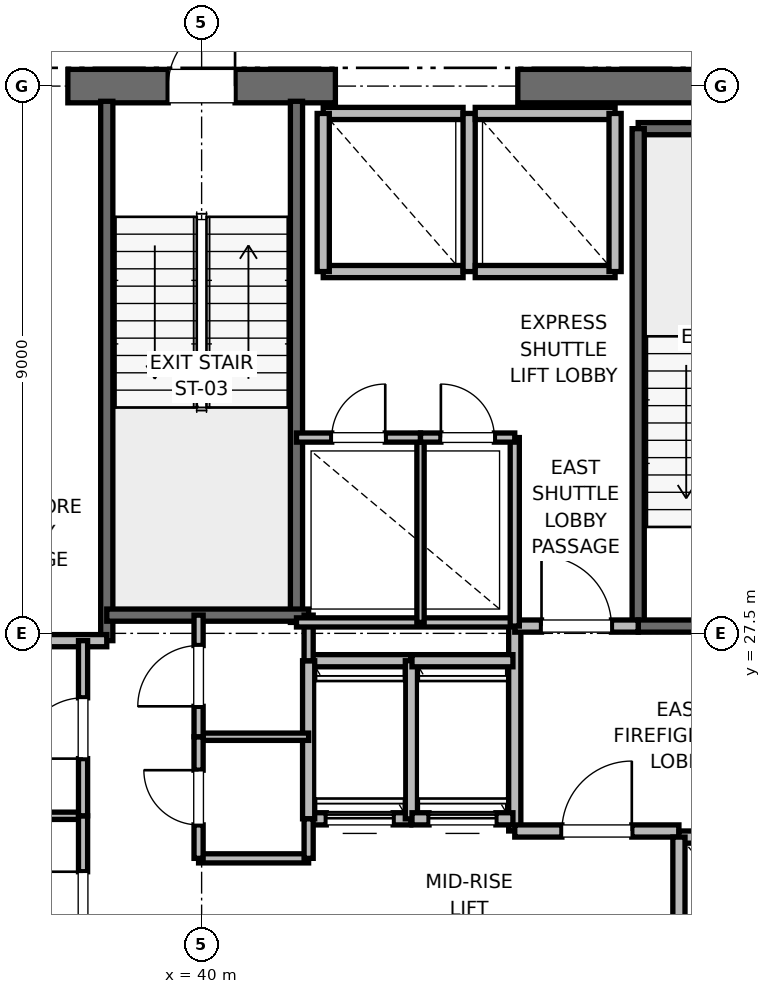
"""IFC4 building model, lengths in metres.
Left out: names, types, materials, properties, quantities, classifications, styles, units other than length and angle.
Written with IfcOpenShell. Run it as: python <this file> out.ifc"""

import sys

from ifc_helpers import new_model, si_unit, direction, frame, frame_2d, origin, place, context, subcontext, project, spatial, rectangle, extrude, element, fill, save


model = new_model("IFC4")
c1 = context("Model", 3, precision=1e-05, world=origin(), true_north=direction((0.0, 1.0)))
c2 = subcontext(c1, "Body", "Model", "MODEL_VIEW")
j1 = project(units=[si_unit("LENGTHUNIT", "METRE"), si_unit("PLANEANGLEUNIT", "RADIAN")], contexts=[c1])
p1 = place(None, origin())
s1 = spatial("IfcSite", under=j1, at=p1, CompositionType="ELEMENT")
p2 = place(p1, origin())
s2 = spatial("IfcBuilding", under=s1, at=p2, CompositionType="ELEMENT")
p3 = place(p2, frame((0.0, 0.0, 209.2)))
s3 = spatial("IfcBuildingStorey", under=s2, at=p3, CompositionType="ELEMENT", Elevation=209.2)
p4 = place(p3, frame((37.8, 36.5, 0.0), z_axis=(0.0, 0.0, 1.0), x_axis=(1.0, 0.0, 0.0)))
e1 = element("IfcWall", 1, at=p4, inside=s3, PredefinedType="SHEAR", context=c2, shape_type="SweptSolid", body=[
    extrude(rectangle(XDim=4.4, YDim=0.55, at=frame_2d((2.2, 0.0))), origin(), (0.0, 0.0, 1.0), 3.775),
])
p5 = place(p4, frame((1.65, 0.0, 0.0)))
e2 = element("IfcOpeningElement", 2, at=p5, cuts=e1, PredefinedType="OPENING", context=c2, shape_type="SweptSolid", body=[
    extrude(rectangle(XDim=1.1, YDim=2.15, at=frame_2d((0.55, 1.075))), frame((0.0, 0.275, 0.0), z_axis=(0.0, -1.0, 0.0), x_axis=(1.0, 0.0, 0.0)), (0.0, 0.0, 1.0), 0.55),
])
p6 = place(p3, frame((45.2, 36.5, 0.0), z_axis=(0.0, 0.0, 1.0), x_axis=(1.0, 0.0, 0.0)))
e3 = element("IfcWall", 3, at=p6, inside=s3, PredefinedType="SHEAR", context=c2, shape_type="SweptSolid", body=[
    extrude(rectangle(XDim=5.8, YDim=0.55, at=frame_2d((2.9, 0.0))), origin(), (0.0, 0.0, 1.0), 3.775),
])
p7 = place(p3, frame((47.18, 35.8, 0.0), z_axis=(0.0, 0.0, 1.0), x_axis=(1.0, 0.0, 0.0)))
e4 = element("IfcWall", 4, at=p7, inside=s3, PredefinedType="SOLIDWALL", context=c2, shape_type="SweptSolid", body=[
    extrude(rectangle(XDim=3.12, YDim=0.2, at=frame_2d((1.56, 0.0))), origin(), (0.0, 0.0, 1.0), 3.775),
])
p8 = place(p3, frame((47.18, 27.62, 0.0), z_axis=(0.0, 0.0, 1.0), x_axis=(0.0, 1.0, 0.0)))
e5 = element("IfcWall", 5, at=p8, inside=s3, PredefinedType="SOLIDWALL", context=c2, shape_type="SweptSolid", body=[
    extrude(rectangle(XDim=8.18, YDim=0.2, at=frame_2d((4.09, 0.0))), origin(), (0.0, 0.0, 1.0), 3.775),
])
p9 = place(p3, frame((47.18, 27.62, 0.0), z_axis=(0.0, 0.0, 1.0), x_axis=(1.0, 0.0, 0.0)))
e6 = element("IfcWall", 6, at=p9, inside=s3, PredefinedType="SOLIDWALL", context=c2, shape_type="SweptSolid", body=[
    extrude(rectangle(XDim=3.12, YDim=0.2, at=frame_2d((1.56, 0.0))), origin(), (0.0, 0.0, 1.0), 3.775),
])
p10 = place(p9, frame((1.01, 0.0, 0.0)))
e7 = element("IfcOpeningElement", 7, at=p10, cuts=e6, PredefinedType="OPENING", context=c2, shape_type="SweptSolid", body=[
    extrude(rectangle(XDim=1.1, YDim=2.15, at=frame_2d((0.55, 1.075))), frame((0.0, 0.1, 0.0), z_axis=(0.0, -1.0, 0.0), x_axis=(1.0, 0.0, 0.0)), (0.0, 0.0, 1.0), 0.2),
])
p11 = place(p3, frame((38.44, 27.38, 0.0), z_axis=(0.0, 0.0, 1.0), x_axis=(0.0, 1.0, 0.0)))
e8 = element("IfcWall", 8, at=p11, inside=s3, PredefinedType="SOLIDWALL", context=c2, shape_type="SweptSolid", body=[
    extrude(rectangle(XDim=8.87, YDim=0.2, at=frame_2d((4.435, 0.0))), origin(), (0.0, 0.0, 1.0), 3.775),
])
p12 = place(p3, frame((41.56, 27.68, 0.0), z_axis=(0.0, 0.0, 1.0), x_axis=(0.0, 1.0, 0.0)))
e9 = element("IfcWall", 9, at=p12, inside=s3, PredefinedType="SOLIDWALL", context=c2, shape_type="SweptSolid", body=[
    extrude(rectangle(XDim=8.57, YDim=0.2, at=frame_2d((4.285, 0.0))), origin(), (0.0, 0.0, 1.0), 3.775),
])
p13 = place(p3, frame((38.44, 27.8, 0.0), z_axis=(0.0, 0.0, 1.0), x_axis=(1.0, 0.0, 0.0)))
e10 = element("IfcWall", 10, at=p13, inside=s3, PredefinedType="SOLIDWALL", context=c2, shape_type="SweptSolid", body=[
    extrude(rectangle(XDim=3.32, YDim=0.2, at=frame_2d((1.66, 0.0))), origin(), (0.0, 0.0, 1.0), 3.775),
])
p14 = place(p3, frame((32.82, 27.38, 0.0), z_axis=(0.0, 0.0, 1.0), x_axis=(1.0, 0.0, 0.0)))
e11 = element("IfcWall", 11, at=p14, inside=s3, PredefinedType="PARTITIONING", context=c2, shape_type="SweptSolid", body=[
    extrude(rectangle(XDim=5.62, YDim=0.2, at=frame_2d((2.81, 0.0))), origin(), (0.0, 0.0, 1.0), 3.775),
])
p15 = place(p3, frame((45.15, 24.25, 0.0), z_axis=(0.0, 0.0, 1.0), x_axis=(0.0, 1.0, 0.0)))
e12 = element("IfcWall", 12, at=p15, inside=s3, PredefinedType="PARTITIONING", context=c2, shape_type="SweptSolid", body=[
    extrude(rectangle(XDim=3.37, YDim=0.2, at=frame_2d((1.685, 0.0))), origin(), (0.0, 0.0, 1.0), 3.775),
])
p16 = place(p3, frame((45.15, 24.25, 0.0), z_axis=(0.0, 0.0, 1.0), x_axis=(1.0, 0.0, 0.0)))
e13 = element("IfcWall", 13, at=p16, inside=s3, PredefinedType="PARTITIONING", context=c2, shape_type="SweptSolid", body=[
    extrude(rectangle(XDim=2.7, YDim=0.2, at=frame_2d((1.35, 0.0))), origin(), (0.0, 0.0, 1.0), 3.775),
])
p17 = place(p16, frame((0.775, 0.0, 0.0)))
e14 = element("IfcOpeningElement", 14, at=p17, cuts=e13, PredefinedType="OPENING", context=c2, shape_type="SweptSolid", body=[
    extrude(rectangle(XDim=1.15, YDim=2.2, at=frame_2d((0.575, 1.1))), frame((0.0, 0.1, 0.0), z_axis=(0.0, -1.0, 0.0), x_axis=(1.0, 0.0, 0.0)), (0.0, 0.0, 1.0), 0.2),
])
p18 = place(p3, frame((45.15, 27.62, 0.0), z_axis=(0.0, 0.0, 1.0), x_axis=(1.0, 0.0, 0.0)))
e15 = element("IfcWall", 15, at=p18, inside=s3, PredefinedType="PARTITIONING", context=c2, shape_type="SweptSolid", body=[
    extrude(rectangle(XDim=2.03, YDim=0.2, at=frame_2d((1.015, 0.0))), origin(), (0.0, 0.0, 1.0), 3.775),
])
p19 = place(p18, frame((0.44, 0.0, 0.0)))
e16 = element("IfcOpeningElement", 16, at=p19, cuts=e15, PredefinedType="OPENING", context=c2, shape_type="SweptSolid", body=[
    extrude(rectangle(XDim=1.15, YDim=2.2, at=frame_2d((0.575, 1.1))), frame((0.0, 0.1, 0.0), z_axis=(0.0, -1.0, 0.0), x_axis=(1.0, 0.0, 0.0)), (0.0, 0.0, 1.0), 0.2),
])
p20 = place(p3, frame((50.45, 24.15, 0.0), z_axis=(0.0, 0.0, 1.0), x_axis=(-1.0, 0.0, 0.0)))
e17 = element("IfcWall", 17, at=p20, inside=s3, PredefinedType="SOLIDWALL", context=c2, shape_type="SweptSolid", body=[
    extrude(rectangle(XDim=2.6, YDim=0.2, at=frame_2d((1.3, 0.0))), origin(), (0.0, 0.0, 1.0), 2.755),
])
p21 = place(p20, frame((0.75, 0.0, 0.0)))
e18 = element("IfcOpeningElement", 18, at=p21, cuts=e17, PredefinedType="OPENING", context=c2, shape_type="SweptSolid", body=[
    extrude(rectangle(XDim=1.1, YDim=2.2, at=frame_2d((0.55, 1.1))), frame((0.0, 0.1, 0.0), z_axis=(0.0, -1.0, 0.0), x_axis=(1.0, 0.0, 0.0)), (0.0, 0.0, 1.0), 0.2),
])
p22 = place(p3, frame((47.85, 24.15, 0.0), z_axis=(0.0, 0.0, 1.0), x_axis=(0.0, -1.0, 0.0)))
e19 = element("IfcWall", 19, at=p22, inside=s3, PredefinedType="SOLIDWALL", context=c2, shape_type="SweptSolid", body=[
    extrude(rectangle(XDim=3.0, YDim=0.2, at=frame_2d((1.5, 0.0))), origin(), (0.0, 0.0, 1.0), 3.775),
])
p23 = place(p3, frame((41.76, 24.45, 0.0), z_axis=(0.0, 0.0, 1.0), x_axis=(1.0, 0.0, 0.0)))
e20 = element("IfcWall", 20, at=p23, inside=s3, PredefinedType="SOLIDWALL", context=c2, shape_type="SweptSolid", body=[
    extrude(rectangle(XDim=1.68, YDim=0.2, at=frame_2d((0.84, 0.0))), origin(), (0.0, 0.0, 1.0), 3.775),
])
p24 = place(p23, frame((0.29, 0.0, 0.0)))
e21 = element("IfcOpeningElement", 21, at=p24, cuts=e20, PredefinedType="OPENING", context=c2, shape_type="SweptSolid", body=[
    extrude(rectangle(XDim=1.1, YDim=2.2, at=frame_2d((0.55, 1.1))), frame((0.0, 0.1, 0.0), z_axis=(0.0, -1.0, 0.0), x_axis=(1.0, 0.0, 0.0)), (0.0, 0.0, 1.0), 0.2),
])
p25 = place(p3, frame((43.44, 27.05, 0.0), z_axis=(0.0, 0.0, 1.0), x_axis=(-1.0, 0.0, 0.0)))
e22 = element("IfcWall", 22, at=p25, inside=s3, PredefinedType="SOLIDWALL", context=c2, shape_type="SweptSolid", body=[
    extrude(rectangle(XDim=1.68, YDim=0.2, at=frame_2d((0.84, 0.0))), origin(), (0.0, 0.0, 1.0), 3.775),
])
for number, where, z_axis, x_axis in (
    (23, (41.76, 27.05, 0.0), (0.0, 0.0, 1.0), (0.0, -1.0, 0.0)),
    (24, (43.45, 24.45, 0.0), (0.0, 0.0, 1.0), (0.0, 1.0, 0.0)),
):
    element("IfcWall", number, at=place(p3, frame(where, z_axis=z_axis, x_axis=x_axis)), inside=s3, PredefinedType="SOLIDWALL", context=c2, shape_type="SweptSolid", body=[
        extrude(rectangle(XDim=2.6, YDim=0.2, at=frame_2d((1.3, 0.0))), origin(), (0.0, 0.0, 1.0), 3.775),
    ])
p26 = place(p3, frame((43.46, 24.45, 0.0), z_axis=(0.0, 0.0, 1.0), x_axis=(1.0, 0.0, 0.0)))
e25 = element("IfcWall", 25, at=p26, inside=s3, PredefinedType="SOLIDWALL", context=c2, shape_type="SweptSolid", body=[
    extrude(rectangle(XDim=1.66, YDim=0.2, at=frame_2d((0.83, 0.0))), origin(), (0.0, 0.0, 1.0), 3.775),
])
p27 = place(p26, frame((0.28, 0.0, 0.0)))
e26 = element("IfcOpeningElement", 26, at=p27, cuts=e25, PredefinedType="OPENING", context=c2, shape_type="SweptSolid", body=[
    extrude(rectangle(XDim=1.1, YDim=2.2, at=frame_2d((0.55, 1.1))), frame((0.0, 0.1, 0.0), z_axis=(0.0, -1.0, 0.0), x_axis=(1.0, 0.0, 0.0)), (0.0, 0.0, 1.0), 0.2),
])
p28 = place(p3, frame((45.12, 27.05, 0.0), z_axis=(0.0, 0.0, 1.0), x_axis=(-1.0, 0.0, 0.0)))
e27 = element("IfcWall", 27, at=p28, inside=s3, PredefinedType="SOLIDWALL", context=c2, shape_type="SweptSolid", body=[
    extrude(rectangle(XDim=1.66, YDim=0.2, at=frame_2d((0.83, 0.0))), origin(), (0.0, 0.0, 1.0), 3.775),
])
p29 = place(p3, frame((42.0, 33.45, 0.0), z_axis=(0.0, 0.0, 1.0), x_axis=(1.0, 0.0, 0.0)))
e28 = element("IfcWall", 28, at=p29, inside=s3, PredefinedType="SOLIDWALL", context=c2, shape_type="SweptSolid", body=[
    extrude(rectangle(XDim=2.3, YDim=0.2, at=frame_2d((1.15, 0.0))), origin(), (0.0, 0.0, 1.0), 3.775),
])
p30 = place(p3, frame((44.3, 36.05, 0.0), z_axis=(0.0, 0.0, 1.0), x_axis=(-1.0, 0.0, 0.0)))
e29 = element("IfcWall", 29, at=p30, inside=s3, PredefinedType="SOLIDWALL", context=c2, shape_type="SweptSolid", body=[
    extrude(rectangle(XDim=2.3, YDim=0.2, at=frame_2d((1.15, 0.0))), origin(), (0.0, 0.0, 1.0), 2.755),
])
for number, where, z_axis, x_axis in (
    (30, (42.0, 36.05, 0.0), (0.0, 0.0, 1.0), (0.0, -1.0, 0.0)),
    (31, (44.4, 33.45, 0.0), (0.0, 0.0, 1.0), (0.0, 1.0, 0.0)),
):
    element("IfcWall", number, at=place(p3, frame(where, z_axis=z_axis, x_axis=x_axis)), inside=s3, PredefinedType="SOLIDWALL", context=c2, shape_type="SweptSolid", body=[
        extrude(rectangle(XDim=2.6, YDim=0.2, at=frame_2d((1.3, 0.0))), origin(), (0.0, 0.0, 1.0), 2.755),
    ])
p31 = place(p3, frame((44.5, 33.45, 0.0), z_axis=(0.0, 0.0, 1.0), x_axis=(1.0, 0.0, 0.0)))
e32 = element("IfcWall", 32, at=p31, inside=s3, PredefinedType="SOLIDWALL", context=c2, shape_type="SweptSolid", body=[
    extrude(rectangle(XDim=2.3, YDim=0.2, at=frame_2d((1.15, 0.0))), origin(), (0.0, 0.0, 1.0), 3.775),
])
p32 = place(p3, frame((46.8, 36.05, 0.0), z_axis=(0.0, 0.0, 1.0), x_axis=(-1.0, 0.0, 0.0)))
e33 = element("IfcWall", 33, at=p32, inside=s3, PredefinedType="SOLIDWALL", context=c2, shape_type="SweptSolid", body=[
    extrude(rectangle(XDim=2.3, YDim=0.2, at=frame_2d((1.15, 0.0))), origin(), (0.0, 0.0, 1.0), 2.755),
])
p33 = place(p3, frame((46.8, 33.45, 0.0), z_axis=(0.0, 0.0, 1.0), x_axis=(0.0, 1.0, 0.0)))
e34 = element("IfcWall", 34, at=p33, inside=s3, PredefinedType="SOLIDWALL", context=c2, shape_type="SweptSolid", body=[
    extrude(rectangle(XDim=2.6, YDim=0.2, at=frame_2d((1.3, 0.0))), origin(), (0.0, 0.0, 1.0), 3.775),
])
p34 = place(p3, frame((39.95, 23.8, 0.0), z_axis=(0.0, 0.0, 1.0), x_axis=(1.0, 0.0, 0.0)))
e35 = element("IfcWall", 35, at=p34, inside=s3, PredefinedType="PARTITIONING", context=c2, shape_type="SweptSolid", body=[
    extrude(rectangle(XDim=1.81, YDim=0.15, at=frame_2d((0.905, 0.0))), origin(), (0.0, 0.0, 1.0), 2.85),
])
p35 = place(p3, frame((39.95, 25.8, 0.0), z_axis=(0.0, 0.0, 1.0), x_axis=(1.0, 0.0, 0.0)))
e36 = element("IfcWall", 36, at=p35, inside=s3, PredefinedType="PARTITIONING", context=c2, shape_type="SweptSolid", body=[
    extrude(rectangle(XDim=1.81, YDim=0.12, at=frame_2d((0.905, 0.0))), origin(), (0.0, 0.0, 1.0), 2.85),
])
p36 = place(p3, frame((41.76, 23.8, 0.0), z_axis=(0.0, 0.0, 1.0), x_axis=(0.0, 1.0, 0.0)))
e37 = element("IfcWall", 37, at=p36, inside=s3, PredefinedType="PARTITIONING", context=c2, shape_type="SweptSolid", body=[
    extrude(rectangle(XDim=0.65, YDim=0.15, at=frame_2d((0.325, 0.0))), origin(), (0.0, 0.0, 1.0), 2.85),
])
p37 = place(p3, frame((41.76, 27.05, 0.0), z_axis=(0.0, 0.0, 1.0), x_axis=(0.0, 1.0, 0.0)))
e38 = element("IfcWall", 38, at=p37, inside=s3, PredefinedType="PARTITIONING", context=c2, shape_type="SweptSolid", body=[
    extrude(rectangle(XDim=0.75, YDim=0.15, at=frame_2d((0.375, 0.0))), origin(), (0.0, 0.0, 1.0), 2.85),
])
p38 = place(p3, frame((39.95, 23.8, 0.0), z_axis=(0.0, 0.0, 1.0), x_axis=(0.0, 1.0, 0.0)))
e39 = element("IfcWall", 39, at=p38, inside=s3, PredefinedType="PARTITIONING", context=c2, shape_type="SweptSolid", body=[
    extrude(rectangle(XDim=2.0, YDim=0.15, at=frame_2d((1.0, 0.0))), origin(), (0.0, 0.0, 1.0), 2.85),
])
p39 = place(p38, frame((0.55, 0.0, 0.0)))
e40 = element("IfcOpeningElement", 40, at=p39, cuts=e39, PredefinedType="OPENING", context=c2, shape_type="SweptSolid", body=[
    extrude(rectangle(XDim=0.9, YDim=2.1, at=frame_2d((0.45, 1.05))), frame((0.0, 0.075, 0.0), z_axis=(0.0, -1.0, 0.0), x_axis=(1.0, 0.0, 0.0)), (0.0, 0.0, 1.0), 0.15),
])
p40 = place(p3, frame((39.95, 25.8, 0.0), z_axis=(0.0, 0.0, 1.0), x_axis=(0.0, 1.0, 0.0)))
e41 = element("IfcWall", 41, at=p40, inside=s3, PredefinedType="PARTITIONING", context=c2, shape_type="SweptSolid", body=[
    extrude(rectangle(XDim=2.0, YDim=0.15, at=frame_2d((1.0, 0.0))), origin(), (0.0, 0.0, 1.0), 2.85),
])
p41 = place(p40, frame((0.5, 0.0, 0.0)))
e42 = element("IfcOpeningElement", 42, at=p41, cuts=e41, PredefinedType="OPENING", context=c2, shape_type="SweptSolid", body=[
    extrude(rectangle(XDim=1.0, YDim=2.15, at=frame_2d((0.5, 1.075))), frame((0.0, 0.075, 0.0), z_axis=(0.0, -1.0, 0.0), x_axis=(1.0, 0.0, 0.0)), (0.0, 0.0, 1.0), 0.15),
])
p42 = place(p3, frame((32.82, 24.5, 0.0), z_axis=(0.0, 0.0, 1.0), x_axis=(1.0, 0.0, 0.0)))
e43 = element("IfcWall", 43, at=p42, inside=s3, PredefinedType="PARTITIONING", context=c2, shape_type="SweptSolid", body=[
    extrude(rectangle(XDim=5.23, YDim=0.12, at=frame_2d((2.615, 0.0))), origin(), (0.0, 0.0, 1.0), 2.85),
])
p43 = place(p3, frame((38.05, 21.66, 0.0), z_axis=(0.0, 0.0, 1.0), x_axis=(0.0, 1.0, 0.0)))
e44 = element("IfcWall", 44, at=p43, inside=s3, PredefinedType="PARTITIONING", context=c2, shape_type="SweptSolid", body=[
    extrude(rectangle(XDim=2.84, YDim=0.15, at=frame_2d((1.42, 0.0))), origin(), (0.0, 0.0, 1.0), 2.85),
])
p44 = place(p43, frame((0.92, 0.0, 0.0)))
e45 = element("IfcOpeningElement", 45, at=p44, cuts=e44, PredefinedType="OPENING", context=c2, shape_type="SweptSolid", body=[
    extrude(rectangle(XDim=1.0, YDim=2.15, at=frame_2d((0.5, 1.075))), frame((0.0, 0.075, 0.0), z_axis=(0.0, -1.0, 0.0), x_axis=(1.0, 0.0, 0.0)), (0.0, 0.0, 1.0), 0.15),
])
p45 = place(p3, frame((38.05, 24.5, 0.0), z_axis=(0.0, 0.0, 1.0), x_axis=(0.0, 1.0, 0.0)))
e46 = element("IfcWall", 46, at=p45, inside=s3, PredefinedType="PARTITIONING", context=c2, shape_type="SweptSolid", body=[
    extrude(rectangle(XDim=2.88, YDim=0.15, at=frame_2d((1.44, 0.0))), origin(), (0.0, 0.0, 1.0), 2.85),
])
p46 = place(p45, frame((0.94, 0.0, 0.0)))
e47 = element("IfcOpeningElement", 47, at=p46, cuts=e46, PredefinedType="OPENING", context=c2, shape_type="SweptSolid", body=[
    extrude(rectangle(XDim=1.0, YDim=2.15, at=frame_2d((0.5, 1.075))), frame((0.0, 0.075, 0.0), z_axis=(0.0, -1.0, 0.0), x_axis=(1.0, 0.0, 0.0)), (0.0, 0.0, 1.0), 0.15),
])
p47 = place(p3, frame((41.56, 27.68, 0.0), z_axis=(0.0, 0.0, 1.0), x_axis=(1.0, 0.0, 0.0)))
e48 = element("IfcWall", 48, at=p47, inside=s3, PredefinedType="PARTITIONING", context=c2, shape_type="SweptSolid", body=[
    extrude(rectangle(XDim=3.59, YDim=0.15, at=frame_2d((1.795, 0.0))), origin(), (0.0, 0.0, 1.0), 2.85),
])
p48 = place(p3, frame((45.15, 27.62, 0.0), z_axis=(0.0, 0.0, 1.0), x_axis=(0.0, 1.0, 0.0)))
e49 = element("IfcWall", 49, at=p48, inside=s3, PredefinedType="PARTITIONING", context=c2, shape_type="SweptSolid", body=[
    extrude(rectangle(XDim=3.1, YDim=0.15, at=frame_2d((1.55, 0.0))), origin(), (0.0, 0.0, 1.0), 2.85),
])
p49 = place(p3, frame((43.6, 27.68, 0.0), z_axis=(0.0, 0.0, 1.0), x_axis=(0.0, 1.0, 0.0)))
e50 = element("IfcWall", 50, at=p49, inside=s3, PredefinedType="PARTITIONING", context=c2, shape_type="SweptSolid", body=[
    extrude(rectangle(XDim=3.04, YDim=0.12, at=frame_2d((1.52, 0.0))), origin(), (0.0, 0.0, 1.0), 2.85),
])
p50 = place(p3, frame((41.56, 30.72, 0.0), z_axis=(0.0, 0.0, 1.0), x_axis=(1.0, 0.0, 0.0)))
e51 = element("IfcWall", 51, at=p50, inside=s3, PredefinedType="PARTITIONING", context=c2, shape_type="SweptSolid", body=[
    extrude(rectangle(XDim=2.04, YDim=0.15, at=frame_2d((1.02, 0.0))), origin(), (0.0, 0.0, 1.0), 2.85),
])
p51 = place(p50, frame((0.58, 0.0, 0.0)))
e52 = element("IfcOpeningElement", 52, at=p51, cuts=e51, PredefinedType="OPENING", context=c2, shape_type="SweptSolid", body=[
    extrude(rectangle(XDim=0.88, YDim=2.1, at=frame_2d((0.44, 1.05))), frame((0.0, 0.075, 0.0), z_axis=(0.0, -1.0, 0.0), x_axis=(1.0, 0.0, 0.0)), (0.0, 0.0, 1.0), 0.15),
])
p52 = place(p3, frame((43.6, 30.72, 0.0), z_axis=(0.0, 0.0, 1.0), x_axis=(1.0, 0.0, 0.0)))
e53 = element("IfcWall", 53, at=p52, inside=s3, PredefinedType="PARTITIONING", context=c2, shape_type="SweptSolid", body=[
    extrude(rectangle(XDim=1.55, YDim=0.15, at=frame_2d((0.775, 0.0))), origin(), (0.0, 0.0, 1.0), 2.85),
])
p53 = place(p52, frame((0.335, 0.0, 0.0)))
e54 = element("IfcOpeningElement", 54, at=p53, cuts=e53, PredefinedType="OPENING", context=c2, shape_type="SweptSolid", body=[
    extrude(rectangle(XDim=0.88, YDim=2.1, at=frame_2d((0.44, 1.05))), frame((0.0, 0.075, 0.0), z_axis=(0.0, -1.0, 0.0), x_axis=(1.0, 0.0, 0.0)), (0.0, 0.0, 1.0), 0.15),
])
p54 = place(p5, origin())
e55 = element("IfcDoor", 55, at=p54, inside=s3, OperationType="SINGLE_SWING_RIGHT", PredefinedType="DOOR", context=c2, shape_type="SweptSolid", body=[
    extrude(rectangle(XDim=1.1, YDim=2.15, at=frame_2d((0.55, 1.075))), frame((0.0, 0.025, 0.0), z_axis=(0.0, -1.0, 0.0), x_axis=(1.0, 0.0, 0.0)), (0.0, 0.0, 1.0), 0.05),
])
fill(e2, e55)
p55 = place(p17, origin())
e56 = element("IfcDoor", 56, at=p55, inside=s3, OperationType="SINGLE_SWING_RIGHT", PredefinedType="DOOR", context=c2, shape_type="SweptSolid", body=[
    extrude(rectangle(XDim=1.15, YDim=2.2, at=frame_2d((0.575, 1.1))), frame((0.0, 0.025, 0.0), z_axis=(0.0, -1.0, 0.0), x_axis=(1.0, 0.0, 0.0)), (0.0, 0.0, 1.0), 0.05),
])
fill(e14, e56)
p56 = place(p19, origin())
e57 = element("IfcDoor", 57, at=p56, inside=s3, OperationType="SINGLE_SWING_LEFT", PredefinedType="DOOR", context=c2, shape_type="SweptSolid", body=[
    extrude(rectangle(XDim=1.15, YDim=2.2, at=frame_2d((0.575, 1.1))), frame((0.0, 0.025, 0.0), z_axis=(0.0, -1.0, 0.0), x_axis=(1.0, 0.0, 0.0)), (0.0, 0.0, 1.0), 0.05),
])
fill(e16, e57)
p57 = place(p24, origin())
e58 = element("IfcDoor", 58, at=p57, inside=s3, OperationType="SLIDING_TO_RIGHT", PredefinedType="DOOR", context=c2, shape_type="SweptSolid", body=[
    extrude(rectangle(XDim=1.1, YDim=2.2, at=frame_2d((0.55, 1.1))), frame((0.0, 0.025, 0.0), z_axis=(0.0, -1.0, 0.0), x_axis=(1.0, 0.0, 0.0)), (0.0, 0.0, 1.0), 0.05),
])
fill(e21, e58)
p58 = place(p27, origin())
e59 = element("IfcDoor", 59, at=p58, inside=s3, OperationType="SLIDING_TO_RIGHT", PredefinedType="DOOR", context=c2, shape_type="SweptSolid", body=[
    extrude(rectangle(XDim=1.1, YDim=2.2, at=frame_2d((0.55, 1.1))), frame((0.0, 0.025, 0.0), z_axis=(0.0, -1.0, 0.0), x_axis=(1.0, 0.0, 0.0)), (0.0, 0.0, 1.0), 0.05),
])
fill(e26, e59)
p59 = place(p39, origin())
e60 = element("IfcDoor", 60, at=p59, inside=s3, OperationType="SINGLE_SWING_RIGHT", PredefinedType="DOOR", context=c2, shape_type="SweptSolid", body=[
    extrude(rectangle(XDim=0.9, YDim=2.1, at=frame_2d((0.45, 1.05))), frame((0.0, 0.025, 0.0), z_axis=(0.0, -1.0, 0.0), x_axis=(1.0, 0.0, 0.0)), (0.0, 0.0, 1.0), 0.05),
])
fill(e40, e60)
p60 = place(p41, origin())
e61 = element("IfcDoor", 61, at=p60, inside=s3, OperationType="SINGLE_SWING_LEFT", PredefinedType="DOOR", context=c2, shape_type="SweptSolid", body=[
    extrude(rectangle(XDim=1.0, YDim=2.15, at=frame_2d((0.5, 1.075))), frame((0.0, 0.025, 0.0), z_axis=(0.0, -1.0, 0.0), x_axis=(1.0, 0.0, 0.0)), (0.0, 0.0, 1.0), 0.05),
])
fill(e42, e61)
p61 = place(p44, origin())
e62 = element("IfcDoor", 62, at=p61, inside=s3, OperationType="SINGLE_SWING_RIGHT", PredefinedType="DOOR", context=c2, shape_type="SweptSolid", body=[
    extrude(rectangle(XDim=1.0, YDim=2.15, at=frame_2d((0.5, 1.075))), frame((0.0, 0.025, 0.0), z_axis=(0.0, -1.0, 0.0), x_axis=(1.0, 0.0, 0.0)), (0.0, 0.0, 1.0), 0.05),
])
fill(e45, e62)
p62 = place(p46, origin())
e63 = element("IfcDoor", 63, at=p62, inside=s3, OperationType="SINGLE_SWING_LEFT", PredefinedType="DOOR", context=c2, shape_type="SweptSolid", body=[
    extrude(rectangle(XDim=1.0, YDim=2.15, at=frame_2d((0.5, 1.075))), frame((0.0, 0.025, 0.0), z_axis=(0.0, -1.0, 0.0), x_axis=(1.0, 0.0, 0.0)), (0.0, 0.0, 1.0), 0.05),
])
fill(e47, e63)
p63 = place(p51, origin())
e64 = element("IfcDoor", 64, at=p63, inside=s3, OperationType="SINGLE_SWING_RIGHT", PredefinedType="DOOR", context=c2, shape_type="SweptSolid", body=[
    extrude(rectangle(XDim=0.88, YDim=2.1, at=frame_2d((0.44, 1.05))), frame((0.0, 0.025, 0.0), z_axis=(0.0, -1.0, 0.0), x_axis=(1.0, 0.0, 0.0)), (0.0, 0.0, 1.0), 0.05),
])
fill(e52, e64)
p64 = place(p53, origin())
e65 = element("IfcDoor", 65, at=p64, inside=s3, OperationType="SINGLE_SWING_LEFT", PredefinedType="DOOR", context=c2, shape_type="SweptSolid", body=[
    extrude(rectangle(XDim=0.88, YDim=2.1, at=frame_2d((0.44, 1.05))), frame((0.0, 0.025, 0.0), z_axis=(0.0, -1.0, 0.0), x_axis=(1.0, 0.0, 0.0)), (0.0, 0.0, 1.0), 0.05),
])
fill(e54, e65)
save(model, sys.argv[1])
